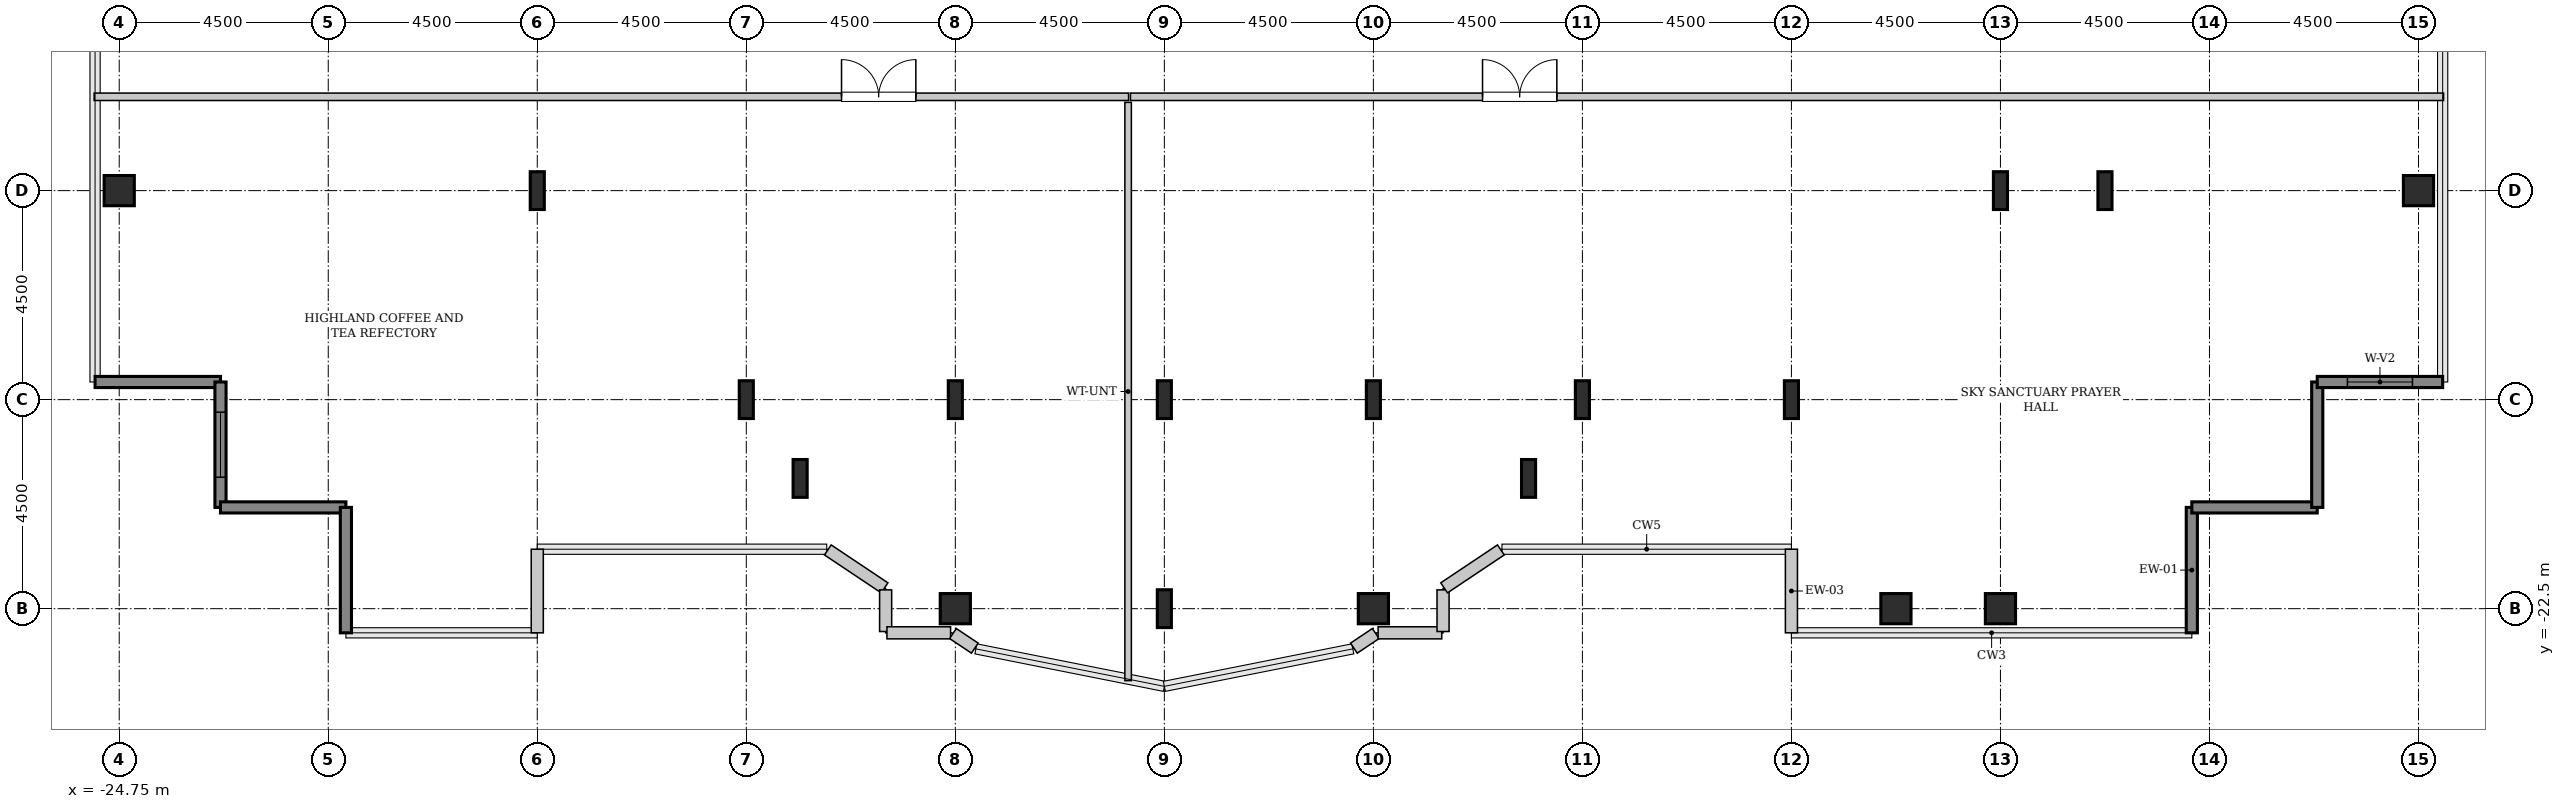
"""IFC4 building model, lengths in metres.
Left out: names, types, materials, properties, quantities, classifications, styles, units other than length and angle.
Written with IfcOpenShell. Run it as: python <this file> out.ifc"""

import sys

from ifc_helpers import new_model, si_unit, direction, frame, frame_2d, origin, origin_2d, place, context, subcontext, project, spatial, rectangle, hollow_rectangle, i_section, extrude, source, transform, mapped, element, fill, save


model = new_model("IFC4")
c1 = context("Model", 3, precision=1e-05, world=origin(), true_north=direction((0.0, 1.0)))
c2 = subcontext(c1, "Body", "Model", "MODEL_VIEW")
j1 = project(units=[si_unit("LENGTHUNIT", "METRE"), si_unit("PLANEANGLEUNIT", "RADIAN")], contexts=[c1])
p1 = place(None, origin())
s1 = spatial("IfcSite", under=j1, at=p1, CompositionType="ELEMENT")
p2 = place(p1, origin())
s2 = spatial("IfcBuilding", under=s1, at=p2, CompositionType="ELEMENT")
p3 = place(p2, frame((0.0, 0.0, 259.8)))
s3 = spatial("IfcBuildingStorey", under=s2, at=p3, CompositionType="ELEMENT", Elevation=259.8)
m1 = source(origin(), c2, "Body", "SweptSolid", [
    extrude(hollow_rectangle(XDim=0.65, YDim=0.65, WallThickness=0.032, InnerFilletRadius=0.032, OuterFilletRadius=0.064, at=origin_2d()), origin(), (0.0, 0.0, 1.0), 4.8),
])
p4 = place(p3, frame((-24.75, -13.5, 0.0), z_axis=(0.0, 0.0, 1.0), x_axis=(1.0, 0.0, 0.0)))
e1 = element("IfcColumn", 1, at=p4, inside=s3, PredefinedType="COLUMN", context=c2, shape_type="MappedRepresentation", body=[
    mapped(m1, transform((0.0, 0.0, 0.0), x_axis=(1.0, 0.0, 0.0), y_axis=(0.0, 1.0, 0.0), z_axis=(0.0, 0.0, 1.0), scale=1.0)),
])
m2 = source(origin(), c2, "Body", "SweptSolid", [
    extrude(i_section(OverallWidth=0.303, OverallDepth=0.814, WebThickness=0.021, FlangeThickness=0.04, FilletRadius=0.03, at=origin_2d()), origin(), (0.0, 0.0, 1.0), 4.8),
])
for number, where, z_axis, x_axis in (
    (2, (-15.75, -13.5, 0.0), (0.0, 0.0, 1.0), (1.0, 0.0, 0.0)),
    (3, (-11.25, -18.0, 0.0), (0.0, 0.0, 1.0), (1.0, 0.0, 0.0)),
    (4, (-10.091, -19.696, 0.0), (0.0, 0.0, 1.0), (1.0, 0.0, 0.0)),
):
    element("IfcColumn", number, at=place(p3, frame(where, z_axis=z_axis, x_axis=x_axis)), inside=s3, PredefinedType="COLUMN", context=c2, shape_type="MappedRepresentation", body=[
        mapped(m2, transform((0.0, 0.0, 0.0), x_axis=(1.0, 0.0, 0.0), y_axis=(0.0, 1.0, 0.0), z_axis=(0.0, 0.0, 1.0), scale=1.0)),
    ])
p5 = place(p3, frame((-6.75, -22.5, 0.0), z_axis=(0.0, 0.0, 1.0), x_axis=(1.0, 0.0, 0.0)))
e5 = element("IfcColumn", 5, at=p5, inside=s3, PredefinedType="COLUMN", context=c2, shape_type="MappedRepresentation", body=[
    mapped(m1, transform((0.0, 0.0, 0.0), x_axis=(1.0, 0.0, 0.0), y_axis=(0.0, 1.0, 0.0), z_axis=(0.0, 0.0, 1.0), scale=1.0)),
])
for number, where, z_axis, x_axis in (
    (6, (-6.75, -18.0, 0.0), (0.0, 0.0, 1.0), (1.0, 0.0, 0.0)),
    (7, (-2.25, -22.5, 0.0), (0.0, 0.0, 1.0), (1.0, 0.0, 0.0)),
    (8, (-2.25, -18.0, 0.0), (0.0, 0.0, 1.0), (1.0, 0.0, 0.0)),
):
    element("IfcColumn", number, at=place(p3, frame(where, z_axis=z_axis, x_axis=x_axis)), inside=s3, PredefinedType="COLUMN", context=c2, shape_type="MappedRepresentation", body=[
        mapped(m2, transform((0.0, 0.0, 0.0), x_axis=(1.0, 0.0, 0.0), y_axis=(0.0, 1.0, 0.0), z_axis=(0.0, 0.0, 1.0), scale=1.0)),
    ])
p6 = place(p3, frame((2.25, -22.5, 0.0), z_axis=(0.0, 0.0, 1.0), x_axis=(1.0, 0.0, 0.0)))
e9 = element("IfcColumn", 9, at=p6, inside=s3, PredefinedType="COLUMN", context=c2, shape_type="MappedRepresentation", body=[
    mapped(m1, transform((0.0, 0.0, 0.0), x_axis=(1.0, 0.0, 0.0), y_axis=(0.0, 1.0, 0.0), z_axis=(0.0, 0.0, 1.0), scale=1.0)),
])
for number, where, z_axis, x_axis in (
    (10, (2.25, -18.0, 0.0), (0.0, 0.0, 1.0), (1.0, 0.0, 0.0)),
    (11, (5.591, -19.696, 0.0), (0.0, 0.0, 1.0), (1.0, 0.0, 0.0)),
    (12, (6.75, -18.0, 0.0), (0.0, 0.0, 1.0), (1.0, 0.0, 0.0)),
    (13, (11.25, -18.0, 0.0), (0.0, 0.0, 1.0), (1.0, 0.0, 0.0)),
):
    element("IfcColumn", number, at=place(p3, frame(where, z_axis=z_axis, x_axis=x_axis)), inside=s3, PredefinedType="COLUMN", context=c2, shape_type="MappedRepresentation", body=[
        mapped(m2, transform((0.0, 0.0, 0.0), x_axis=(1.0, 0.0, 0.0), y_axis=(0.0, 1.0, 0.0), z_axis=(0.0, 0.0, 1.0), scale=1.0)),
    ])
for number, where, z_axis, x_axis in (
    (14, (13.5, -22.5, 0.0), (0.0, 0.0, 1.0), (1.0, 0.0, 0.0)),
    (15, (15.75, -22.5, 0.0), (0.0, 0.0, 1.0), (1.0, 0.0, 0.0)),
):
    element("IfcColumn", number, at=place(p3, frame(where, z_axis=z_axis, x_axis=x_axis)), inside=s3, PredefinedType="COLUMN", context=c2, shape_type="MappedRepresentation", body=[
        mapped(m1, transform((0.0, 0.0, 0.0), x_axis=(1.0, 0.0, 0.0), y_axis=(0.0, 1.0, 0.0), z_axis=(0.0, 0.0, 1.0), scale=1.0)),
    ])
for number, where, z_axis, x_axis in (
    (16, (15.75, -13.5, 0.0), (0.0, 0.0, 1.0), (1.0, 0.0, 0.0)),
    (17, (18.0, -13.5, 0.0), (0.0, 0.0, 1.0), (1.0, 0.0, 0.0)),
):
    element("IfcColumn", number, at=place(p3, frame(where, z_axis=z_axis, x_axis=x_axis)), inside=s3, PredefinedType="COLUMN", context=c2, shape_type="MappedRepresentation", body=[
        mapped(m2, transform((0.0, 0.0, 0.0), x_axis=(1.0, 0.0, 0.0), y_axis=(0.0, 1.0, 0.0), z_axis=(0.0, 0.0, 1.0), scale=1.0)),
    ])
p7 = place(p3, frame((24.75, -13.5, 0.0), z_axis=(0.0, 0.0, 1.0), x_axis=(1.0, 0.0, 0.0)))
e18 = element("IfcColumn", 18, at=p7, inside=s3, PredefinedType="COLUMN", context=c2, shape_type="MappedRepresentation", body=[
    mapped(m1, transform((0.0, 0.0, 0.0), x_axis=(1.0, 0.0, 0.0), y_axis=(0.0, 1.0, 0.0), z_axis=(0.0, 0.0, 1.0), scale=1.0)),
])
m3 = source(origin(), c2, "Body", "SweptSolid", [
    extrude(rectangle(XDim=1.8, YDim=0.26, at=frame_2d((0.9, 0.0))), origin(), (0.0, 0.0, 1.0), 4.55),
])
p8 = place(p3, frame((11.25, -21.22, 0.0), z_axis=(0.0, 0.0, 1.0), x_axis=(0.0, -1.0, 0.0)))
e19 = element("IfcWall", 19, at=p8, inside=s3, PredefinedType="SOLIDWALL", context=c2, shape_type="MappedRepresentation", body=[
    mapped(m3, transform((0.0, 0.0, 0.0), x_axis=(1.0, 0.0, 0.0), y_axis=(0.0, 1.0, 0.0), z_axis=(0.0, 0.0, 1.0), scale=1.0)),
])
m4 = source(origin(), c2, "Body", "SweptSolid", [
    extrude(rectangle(XDim=2.7, YDim=0.24, at=frame_2d((1.35, 0.0))), origin(), (0.0, 0.0, 1.0), 4.55),
])
for number, where, z_axis, x_axis in (
    (20, (19.87, -23.02, 0.0), (0.0, 0.0, 1.0), (0.0, 1.0, 0.0)),
    (21, (19.87, -20.32, 0.0), (0.0, 0.0, 1.0), (1.0, 0.0, 0.0)),
    (22, (22.57, -20.32, 0.0), (0.0, 0.0, 1.0), (0.0, 1.0, 0.0)),
):
    element("IfcWall", number, at=place(p3, frame(where, z_axis=z_axis, x_axis=x_axis)), inside=s3, PredefinedType="SHEAR", context=c2, shape_type="MappedRepresentation", body=[
        mapped(m4, transform((0.0, 0.0, 0.0), x_axis=(1.0, 0.0, 0.0), y_axis=(0.0, 1.0, 0.0), z_axis=(0.0, 0.0, 1.0), scale=1.0)),
    ])
p9 = place(p3, frame((22.57, -17.62, 0.0), z_axis=(0.0, 0.0, 1.0), x_axis=(1.0, 0.0, 0.0)))
e23 = element("IfcWall", 23, at=p9, inside=s3, PredefinedType="SHEAR", context=c2, shape_type="MappedRepresentation", body=[
    mapped(m4, transform((0.0, 0.0, 0.0), x_axis=(1.0, 0.0, 0.0), y_axis=(0.0, 1.0, 0.0), z_axis=(0.0, 0.0, 1.0), scale=1.0)),
])
p10 = place(p9, frame((0.65, 0.0, 0.85)))
e24 = element("IfcOpeningElement", 24, at=p10, cuts=e23, PredefinedType="OPENING", context=c2, shape_type="SweptSolid", body=[
    extrude(rectangle(XDim=1.4, YDim=1.8, at=frame_2d((0.7, 0.9))), frame((0.0, 0.13, 0.0), z_axis=(0.0, -1.0, 0.0), x_axis=(1.0, 0.0, 0.0)), (0.0, 0.0, 1.0), 0.26),
])
p11 = place(p3, frame((-25.27, -17.62, 0.0), z_axis=(0.0, 0.0, 1.0), x_axis=(1.0, 0.0, 0.0)))
e25 = element("IfcWall", 25, at=p11, inside=s3, PredefinedType="SHEAR", context=c2, shape_type="MappedRepresentation", body=[
    mapped(m4, transform((0.0, 0.0, 0.0), x_axis=(1.0, 0.0, 0.0), y_axis=(0.0, 1.0, 0.0), z_axis=(0.0, 0.0, 1.0), scale=1.0)),
])
p12 = place(p3, frame((-22.57, -17.62, 0.0), z_axis=(0.0, 0.0, 1.0), x_axis=(0.0, -1.0, 0.0)))
e26 = element("IfcWall", 26, at=p12, inside=s3, PredefinedType="SHEAR", context=c2, shape_type="MappedRepresentation", body=[
    mapped(m4, transform((0.0, 0.0, 0.0), x_axis=(1.0, 0.0, 0.0), y_axis=(0.0, 1.0, 0.0), z_axis=(0.0, 0.0, 1.0), scale=1.0)),
])
p13 = place(p12, frame((0.65, 0.0, 0.85)))
e27 = element("IfcOpeningElement", 27, at=p13, cuts=e26, PredefinedType="OPENING", context=c2, shape_type="SweptSolid", body=[
    extrude(rectangle(XDim=1.4, YDim=1.8, at=frame_2d((0.7, 0.9))), frame((0.0, 0.13, 0.0), z_axis=(0.0, -1.0, 0.0), x_axis=(1.0, 0.0, 0.0)), (0.0, 0.0, 1.0), 0.26),
])
for number, where, z_axis, x_axis in (
    (28, (-22.57, -20.32, 0.0), (0.0, 0.0, 1.0), (1.0, 0.0, 0.0)),
    (29, (-19.87, -20.32, 0.0), (0.0, 0.0, 1.0), (0.0, -1.0, 0.0)),
):
    element("IfcWall", number, at=place(p3, frame(where, z_axis=z_axis, x_axis=x_axis)), inside=s3, PredefinedType="SHEAR", context=c2, shape_type="MappedRepresentation", body=[
        mapped(m4, transform((0.0, 0.0, 0.0), x_axis=(1.0, 0.0, 0.0), y_axis=(0.0, 1.0, 0.0), z_axis=(0.0, 0.0, 1.0), scale=1.0)),
    ])
p14 = place(p3, frame((-15.75, -23.02, 0.0), z_axis=(0.0, 0.0, 1.0), x_axis=(0.0, 1.0, 0.0)))
e30 = element("IfcWall", 30, at=p14, inside=s3, PredefinedType="SOLIDWALL", context=c2, shape_type="MappedRepresentation", body=[
    mapped(m3, transform((0.0, 0.0, 0.0), x_axis=(1.0, 0.0, 0.0), y_axis=(0.0, 1.0, 0.0), z_axis=(0.0, 0.0, 1.0), scale=1.0)),
])
m5 = source(origin(), c2, "Body", "SweptSolid", [
    extrude(rectangle(XDim=1.469, YDim=0.26, at=frame_2d((0.734, 0.0))), origin(), (0.0, 0.0, 1.0), 4.55),
])
p15 = place(p3, frame((-9.495, -21.236, 0.0), z_axis=(0.0, 0.0, 1.0), x_axis=(0.831461760506, -0.555581983884, 0.0)))
e31 = element("IfcWall", 31, at=p15, inside=s3, PredefinedType="SOLIDWALL", context=c2, shape_type="MappedRepresentation", body=[
    mapped(m5, transform((0.0, 0.0, 0.0), x_axis=(1.0, 0.0, 0.0), y_axis=(0.0, 1.0, 0.0), z_axis=(0.0, 0.0, 1.0), scale=1.0)),
])
m6 = source(origin(), c2, "Body", "SweptSolid", [
    extrude(rectangle(XDim=0.897, YDim=0.26, at=frame_2d((0.448, 0.0))), origin(), (0.0, 0.0, 1.0), 4.55),
])
p16 = place(p3, frame((-8.25, -22.095, 0.0), z_axis=(0.0, 0.0, 1.0), x_axis=(0.0, -1.0, 0.0)))
e32 = element("IfcWall", 32, at=p16, inside=s3, PredefinedType="SOLIDWALL", context=c2, shape_type="MappedRepresentation", body=[
    mapped(m6, transform((0.0, 0.0, 0.0), x_axis=(1.0, 0.0, 0.0), y_axis=(0.0, 1.0, 0.0), z_axis=(0.0, 0.0, 1.0), scale=1.0)),
])
m7 = source(origin(), c2, "Body", "SweptSolid", [
    extrude(rectangle(XDim=1.37, YDim=0.26, at=frame_2d((0.685, 0.0))), origin(), (0.0, 0.0, 1.0), 4.55),
])
p17 = place(p3, frame((-8.222, -23.02, 0.0), z_axis=(0.0, 0.0, 1.0), x_axis=(1.0, 0.0, 0.0)))
e33 = element("IfcWall", 33, at=p17, inside=s3, PredefinedType="SOLIDWALL", context=c2, shape_type="MappedRepresentation", body=[
    mapped(m7, transform((0.0, 0.0, 0.0), x_axis=(1.0, 0.0, 0.0), y_axis=(0.0, 1.0, 0.0), z_axis=(0.0, 0.0, 1.0), scale=1.0)),
])
m8 = source(origin(), c2, "Body", "SweptSolid", [
    extrude(rectangle(XDim=0.565, YDim=0.26, at=frame_2d((0.283, 0.0))), origin(), (0.0, 0.0, 1.0), 4.55),
])
for number, where, z_axis, x_axis in (
    (34, (-6.801, -23.036, 0.0), (0.0, 0.0, 1.0), (0.832, -0.555, 0.0)),
    (35, (1.831, -23.35, 0.0), (0.0, 0.0, 1.0), (0.832, 0.555, 0.0)),
):
    element("IfcWall", number, at=place(p3, frame(where, z_axis=z_axis, x_axis=x_axis)), inside=s3, PredefinedType="SOLIDWALL", context=c2, shape_type="MappedRepresentation", body=[
        mapped(m8, transform((0.0, 0.0, 0.0), x_axis=(1.0, 0.0, 0.0), y_axis=(0.0, 1.0, 0.0), z_axis=(0.0, 0.0, 1.0), scale=1.0)),
    ])
p18 = place(p3, frame((2.352, -23.02, 0.0), z_axis=(0.0, 0.0, 1.0), x_axis=(1.0, 0.0, 0.0)))
e36 = element("IfcWall", 36, at=p18, inside=s3, PredefinedType="SOLIDWALL", context=c2, shape_type="MappedRepresentation", body=[
    mapped(m7, transform((0.0, 0.0, 0.0), x_axis=(1.0, 0.0, 0.0), y_axis=(0.0, 1.0, 0.0), z_axis=(0.0, 0.0, 1.0), scale=1.0)),
])
p19 = place(p3, frame((3.75, -22.992, 0.0), z_axis=(0.0, 0.0, 1.0), x_axis=(0.0, 1.0, 0.0)))
e37 = element("IfcWall", 37, at=p19, inside=s3, PredefinedType="SOLIDWALL", context=c2, shape_type="MappedRepresentation", body=[
    mapped(m6, transform((0.0, 0.0, 0.0), x_axis=(1.0, 0.0, 0.0), y_axis=(0.0, 1.0, 0.0), z_axis=(0.0, 0.0, 1.0), scale=1.0)),
])
p20 = place(p3, frame((3.773, -22.052, 0.0), z_axis=(0.0, 0.0, 1.0), x_axis=(0.831461760506, 0.555581983884, 0.0)))
e38 = element("IfcWall", 38, at=p20, inside=s3, PredefinedType="SOLIDWALL", context=c2, shape_type="MappedRepresentation", body=[
    mapped(m5, transform((0.0, 0.0, 0.0), x_axis=(1.0, 0.0, 0.0), y_axis=(0.0, 1.0, 0.0), z_axis=(0.0, 0.0, 1.0), scale=1.0)),
])
m9 = source(origin(), c2, "Body", "SweptSolid", [
    extrude(rectangle(XDim=22.27, YDim=0.16, at=frame_2d((11.135, 0.0))), origin(), (0.0, 0.0, 1.0), 4.535),
])
p21 = place(p3, frame((-25.29, -11.48, 0.0), z_axis=(0.0, 0.0, 1.0), x_axis=(1.0, 0.0, 0.0)))
e39 = element("IfcWall", 39, at=p21, inside=s3, PredefinedType="PARTITIONING", context=c2, shape_type="MappedRepresentation", body=[
    mapped(m9, transform((0.0, 0.0, 0.0), x_axis=(1.0, 0.0, 0.0), y_axis=(0.0, 1.0, 0.0), z_axis=(0.0, 0.0, 1.0), scale=1.0)),
])
p22 = place(p21, frame((16.09, 0.0, 0.0)))
e40 = element("IfcOpeningElement", 40, at=p22, cuts=e39, PredefinedType="OPENING", context=c2, shape_type="SweptSolid", body=[
    extrude(rectangle(XDim=1.6, YDim=2.3, at=frame_2d((0.8, 1.15))), frame((0.0, 0.09, 0.0), z_axis=(0.0, -1.0, 0.0), x_axis=(1.0, 0.0, 0.0)), (0.0, 0.0, 1.0), 0.18),
])
m10 = source(origin(), c2, "Body", "SweptSolid", [
    extrude(rectangle(XDim=12.449, YDim=0.14, at=frame_2d((6.225, 0.0))), origin(), (0.0, 0.0, 1.0), 4.535),
])
p23 = place(p3, frame((-3.03, -24.05, 0.0), z_axis=(0.0, 0.0, 1.0), x_axis=(0.0, 1.0, 0.0)))
e41 = element("IfcWall", 41, at=p23, inside=s3, PredefinedType="PARTITIONING", context=c2, shape_type="MappedRepresentation", body=[
    mapped(m10, transform((0.0, 0.0, 0.0), x_axis=(1.0, 0.0, 0.0), y_axis=(0.0, 1.0, 0.0), z_axis=(0.0, 0.0, 1.0), scale=1.0)),
])
m11 = source(origin(), c2, "Body", "SweptSolid", [
    extrude(rectangle(XDim=28.27, YDim=0.16, at=frame_2d((14.135, 0.0))), origin(), (0.0, 0.0, 1.0), 4.535),
])
p24 = place(p3, frame((-2.98, -11.48, 0.0), z_axis=(0.0, 0.0, 1.0), x_axis=(1.0, 0.0, 0.0)))
e42 = element("IfcWall", 42, at=p24, inside=s3, PredefinedType="PARTITIONING", context=c2, shape_type="MappedRepresentation", body=[
    mapped(m11, transform((0.0, 0.0, 0.0), x_axis=(1.0, 0.0, 0.0), y_axis=(0.0, 1.0, 0.0), z_axis=(0.0, 0.0, 1.0), scale=1.0)),
])
p25 = place(p24, frame((7.58, 0.0, 0.0)))
e43 = element("IfcOpeningElement", 43, at=p25, cuts=e42, PredefinedType="OPENING", context=c2, shape_type="SweptSolid", body=[
    extrude(rectangle(XDim=1.6, YDim=2.3, at=frame_2d((0.8, 1.15))), frame((0.0, 0.09, 0.0), z_axis=(0.0, -1.0, 0.0), x_axis=(1.0, 0.0, 0.0)), (0.0, 0.0, 1.0), 0.18),
])
m12 = source(origin(), c2, "Body", "SweptSolid", [
    extrude(rectangle(XDim=1.4, YDim=1.8, at=frame_2d((0.7, 0.9))), frame((0.0, 0.03, 0.0), z_axis=(0.0, -1.0, 0.0), x_axis=(1.0, 0.0, 0.0)), (0.0, 0.0, 1.0), 0.06),
])
p26 = place(p10, origin())
e44 = element("IfcWindow", 44, at=p26, inside=s3, PartitioningType="SINGLE_PANEL", PredefinedType="WINDOW", context=c2, shape_type="MappedRepresentation", body=[
    mapped(m12, transform((0.0, 0.0, 0.0), x_axis=(1.0, 0.0, 0.0), y_axis=(0.0, 1.0, 0.0), z_axis=(0.0, 0.0, 1.0), scale=1.0)),
])
fill(e24, e44)
p27 = place(p13, origin())
e45 = element("IfcWindow", 45, at=p27, inside=s3, PartitioningType="SINGLE_PANEL", PredefinedType="WINDOW", context=c2, shape_type="MappedRepresentation", body=[
    mapped(m12, transform((0.0, 0.0, 0.0), x_axis=(1.0, 0.0, 0.0), y_axis=(0.0, 1.0, 0.0), z_axis=(0.0, 0.0, 1.0), scale=1.0)),
])
fill(e27, e45)
m13 = source(origin(), c2, "Body", "SweptSolid", [
    extrude(rectangle(XDim=1.6, YDim=2.3, at=frame_2d((0.8, 1.15))), frame((0.0, 0.025, 0.0), z_axis=(0.0, -1.0, 0.0), x_axis=(1.0, 0.0, 0.0)), (0.0, 0.0, 1.0), 0.05),
])
p28 = place(p22, origin())
e46 = element("IfcDoor", 46, at=p28, inside=s3, OperationType="DOUBLE_DOOR_SINGLE_SWING", PredefinedType="DOOR", context=c2, shape_type="MappedRepresentation", body=[
    mapped(m13, transform((0.0, 0.0, 0.0), x_axis=(1.0, 0.0, 0.0), y_axis=(0.0, 1.0, 0.0), z_axis=(0.0, 0.0, 1.0), scale=1.0)),
])
fill(e40, e46)
p29 = place(p25, origin())
e47 = element("IfcDoor", 47, at=p29, inside=s3, OperationType="DOUBLE_DOOR_SINGLE_SWING", PredefinedType="DOOR", context=c2, shape_type="MappedRepresentation", body=[
    mapped(m13, transform((0.0, 0.0, 0.0), x_axis=(1.0, 0.0, 0.0), y_axis=(0.0, 1.0, 0.0), z_axis=(0.0, 0.0, 1.0), scale=1.0)),
])
fill(e43, e47)
save(model, sys.argv[1])
